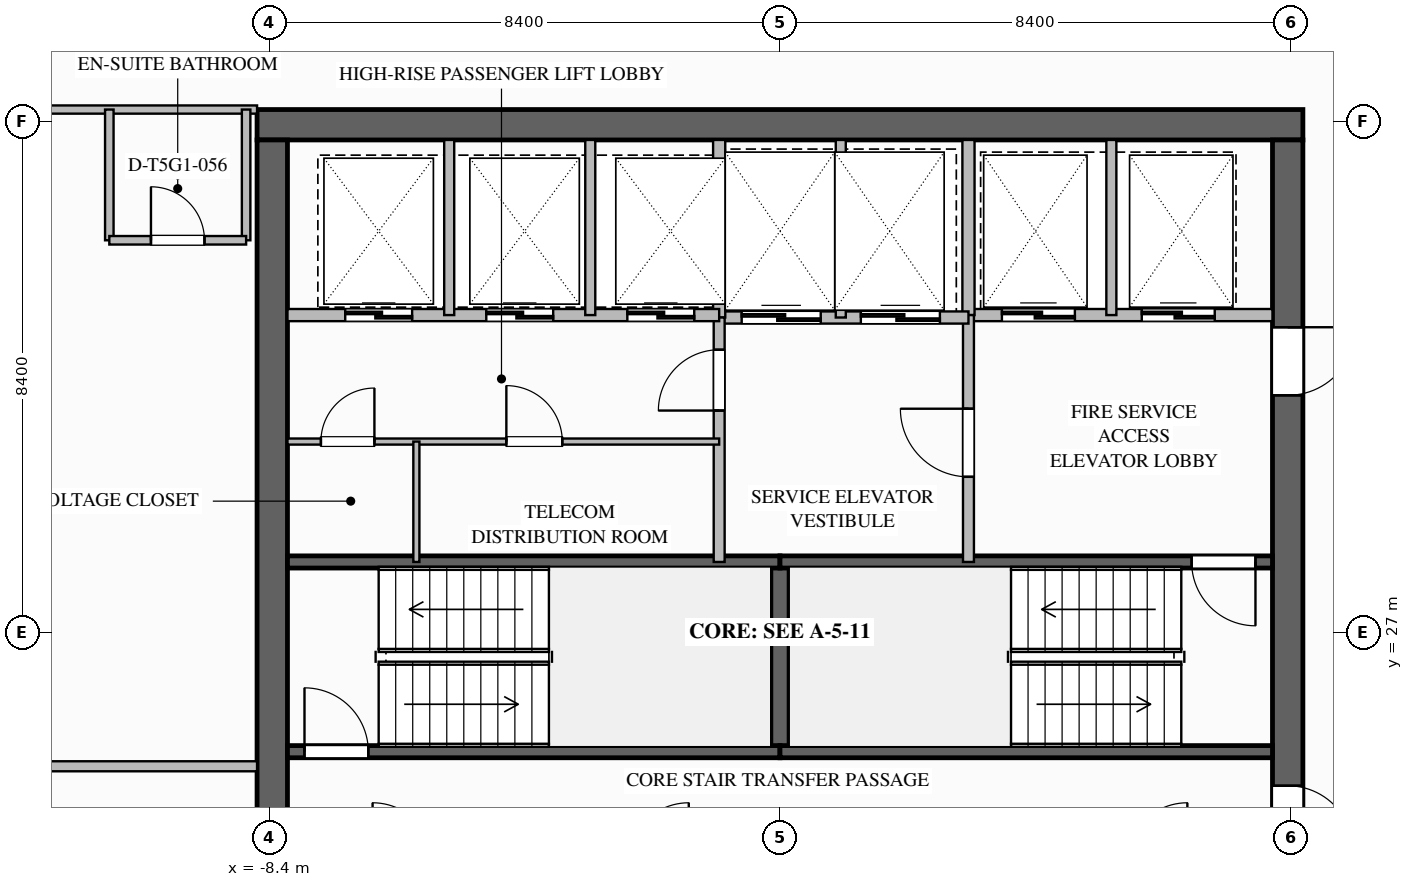
"""IFC4 building model, lengths in metres.
Left out: names, types, materials, properties, quantities, classifications, styles, units other than length and angle.
Written with IfcOpenShell. Run it as: python <this file> out.ifc"""

import sys

from ifc_helpers import new_model, si_unit, direction, frame, frame_2d, origin, place, context, subcontext, project, spatial, rectangle, extrude, element, fill, save


model = new_model("IFC4")
c1 = context("Model", 3, precision=1e-05, world=origin(), true_north=direction((0.0, 1.0)))
c2 = subcontext(c1, "Body", "Model", "MODEL_VIEW")
j1 = project(units=[si_unit("LENGTHUNIT", "METRE"), si_unit("PLANEANGLEUNIT", "RADIAN")], contexts=[c1])
p1 = place(None, origin())
s1 = spatial("IfcSite", under=j1, at=p1, CompositionType="ELEMENT")
p2 = place(p1, origin())
s2 = spatial("IfcBuilding", under=s1, at=p2, CompositionType="ELEMENT")
p3 = place(p2, frame((0.0, 0.0, 265.0)))
s3 = spatial("IfcBuildingStorey", under=s2, at=p3, CompositionType="ELEMENT", Elevation=265.0)
p4 = place(p3, frame((-8.6, 35.35, 0.0), z_axis=(0.0, 0.0, 1.0), x_axis=(1.0, 0.0, 0.0)))
e1 = element("IfcWall", 1, at=p4, inside=s3, PredefinedType="SHEAR", context=c2, shape_type="SweptSolid", body=[
    extrude(rectangle(XDim=17.2, YDim=0.5, at=frame_2d((8.6, 0.0))), origin(), (0.0, 0.0, 1.0), 3.65),
])
p5 = place(p3, frame((8.35, 35.1, 0.0), z_axis=(0.0, 0.0, 1.0), x_axis=(0.0, -1.0, 0.0)))
e2 = element("IfcWall", 2, at=p5, inside=s3, PredefinedType="SHEAR", context=c2, shape_type="SweptSolid", body=[
    extrude(rectangle(XDim=16.2, YDim=0.5, at=frame_2d((8.1, 0.0))), origin(), (0.0, 0.0, 1.0), 3.65),
])
p6 = place(p5, frame((3.08, 0.0, 0.0)))
e3 = element("IfcOpeningElement", 3, at=p6, cuts=e2, PredefinedType="OPENING", context=c2, shape_type="SweptSolid", body=[
    extrude(rectangle(XDim=1.12, YDim=2.1, at=frame_2d((0.56, 1.05))), frame((0.0, 0.26, 0.0), z_axis=(0.0, -1.0, 0.0), x_axis=(1.0, 0.0, 0.0)), (0.0, 0.0, 1.0), 0.52),
])
p7 = place(p5, frame((10.62, 0.0, 0.0)))
e4 = element("IfcOpeningElement", 4, at=p7, cuts=e2, PredefinedType="OPENING", context=c2, shape_type="SweptSolid", body=[
    extrude(rectangle(XDim=1.08, YDim=2.04, at=frame_2d((0.54, 1.02))), frame((0.0, 0.26, 0.0), z_axis=(0.0, -1.0, 0.0), x_axis=(1.0, 0.0, 0.0)), (0.0, 0.0, 1.0), 0.52),
])
p8 = place(p3, frame((-8.35, 18.9, 0.0), z_axis=(0.0, 0.0, 1.0), x_axis=(0.0, 1.0, 0.0)))
e5 = element("IfcWall", 5, at=p8, inside=s3, PredefinedType="SHEAR", context=c2, shape_type="SweptSolid", body=[
    extrude(rectangle(XDim=16.2, YDim=0.5, at=frame_2d((8.1, 0.0))), origin(), (0.0, 0.0, 1.0), 3.65),
])
p9 = place(p3, frame((0.0, 25.04, 0.0), z_axis=(0.0, 0.0, 1.0), x_axis=(0.0, 1.0, 0.0)))
e6 = element("IfcWall", 6, at=p9, inside=s3, PredefinedType="SOLIDWALL", context=c2, shape_type="SweptSolid", body=[
    extrude(rectangle(XDim=3.12, YDim=0.3, at=frame_2d((1.56, 0.0))), origin(), (0.0, 0.0, 1.0), 3.39),
])
p10 = place(p3, frame((-8.1, 25.04, 0.0), z_axis=(0.0, 0.0, 1.0), x_axis=(1.0, 0.0, 0.0)))
e7 = element("IfcWall", 7, at=p10, inside=s3, PredefinedType="SOLIDWALL", context=c2, shape_type="SweptSolid", body=[
    extrude(rectangle(XDim=8.1, YDim=0.2, at=frame_2d((4.05, 0.0))), origin(), (0.0, 0.0, 1.0), 3.39),
])
p11 = place(p10, frame((0.28, 0.0, 0.0)))
e8 = element("IfcOpeningElement", 8, at=p11, cuts=e7, PredefinedType="OPENING", context=c2, shape_type="SweptSolid", body=[
    extrude(rectangle(XDim=1.05, YDim=2.1, at=frame_2d((0.525, 1.05))), frame((0.0, 0.11, 0.0), z_axis=(0.0, -1.0, 0.0), x_axis=(1.0, 0.0, 0.0)), (0.0, 0.0, 1.0), 0.22),
])
for number, where, z_axis, x_axis in (
    (9, (-8.1, 28.16, 0.0), (0.0, 0.0, 1.0), (1.0, 0.0, 0.0)),
    (10, (0.0, 25.04, 0.0), (0.0, 0.0, 1.0), (1.0, 0.0, 0.0)),
):
    element("IfcWall", number, at=place(p3, frame(where, z_axis=z_axis, x_axis=x_axis)), inside=s3, PredefinedType="SOLIDWALL", context=c2, shape_type="SweptSolid", body=[
        extrude(rectangle(XDim=8.1, YDim=0.2, at=frame_2d((4.05, 0.0))), origin(), (0.0, 0.0, 1.0), 3.39),
    ])
p12 = place(p3, frame((8.1, 28.16, 0.0), z_axis=(0.0, 0.0, 1.0), x_axis=(-1.0, 0.0, 0.0)))
e11 = element("IfcWall", 11, at=p12, inside=s3, PredefinedType="SOLIDWALL", context=c2, shape_type="SweptSolid", body=[
    extrude(rectangle(XDim=8.1, YDim=0.2, at=frame_2d((4.05, 0.0))), origin(), (0.0, 0.0, 1.0), 3.39),
])
p13 = place(p12, frame((0.28, 0.0, 0.0)))
e12 = element("IfcOpeningElement", 12, at=p13, cuts=e11, PredefinedType="OPENING", context=c2, shape_type="SweptSolid", body=[
    extrude(rectangle(XDim=1.05, YDim=2.1, at=frame_2d((0.525, 1.05))), frame((0.0, 0.11, 0.0), z_axis=(0.0, -1.0, 0.0), x_axis=(1.0, 0.0, 0.0)), (0.0, 0.0, 1.0), 0.22),
])
p14 = place(p3, frame((3.1, 32.22, 0.0), z_axis=(0.0, 0.0, 1.0), x_axis=(1.0, 0.0, 0.0)))
e13 = element("IfcWall", 13, at=p14, inside=s3, PredefinedType="SOLIDWALL", context=c2, shape_type="SweptSolid", body=[
    extrude(rectangle(XDim=5.0, YDim=0.2, at=frame_2d((2.5, 0.0))), origin(), (0.0, 0.0, 1.0), 3.39),
])
p15 = place(p14, frame((0.55, 0.0, 0.0)))
e14 = element("IfcOpeningElement", 14, at=p15, cuts=e13, PredefinedType="OPENING", context=c2, shape_type="SweptSolid", body=[
    extrude(rectangle(XDim=1.2, YDim=2.2, at=frame_2d((0.6, 1.1))), frame((0.0, 0.11, 0.0), z_axis=(0.0, -1.0, 0.0), x_axis=(1.0, 0.0, 0.0)), (0.0, 0.0, 1.0), 0.22),
])
p16 = place(p14, frame((2.85, 0.0, 0.0)))
e15 = element("IfcOpeningElement", 15, at=p16, cuts=e13, PredefinedType="OPENING", context=c2, shape_type="SweptSolid", body=[
    extrude(rectangle(XDim=1.2, YDim=2.2, at=frame_2d((0.6, 1.1))), frame((0.0, 0.11, 0.0), z_axis=(0.0, -1.0, 0.0), x_axis=(1.0, 0.0, 0.0)), (0.0, 0.0, 1.0), 0.22),
])
p17 = place(p3, frame((3.1, 32.22, 0.0), z_axis=(0.0, 0.0, 1.0), x_axis=(0.0, 1.0, 0.0)))
e16 = element("IfcWall", 16, at=p17, inside=s3, PredefinedType="SOLIDWALL", context=c2, shape_type="SweptSolid", body=[
    extrude(rectangle(XDim=2.88, YDim=0.2, at=frame_2d((1.44, 0.0))), origin(), (0.0, 0.0, 1.0), 3.39),
])
p18 = place(p3, frame((5.45, 32.22, 0.0), z_axis=(0.0, 0.0, 1.0), x_axis=(0.0, 1.0, 0.0)))
e17 = element("IfcWall", 17, at=p18, inside=s3, PredefinedType="PARTITIONING", context=c2, shape_type="SweptSolid", body=[
    extrude(rectangle(XDim=2.88, YDim=0.165, at=frame_2d((1.44, 0.0))), origin(), (0.0, 0.0, 1.0), 3.39),
])
p19 = place(p3, frame((3.1, 28.16, 0.0), z_axis=(0.0, 0.0, 1.0), x_axis=(0.0, 1.0, 0.0)))
e18 = element("IfcWall", 18, at=p19, inside=s3, PredefinedType="SOLIDWALL", context=c2, shape_type="SweptSolid", body=[
    extrude(rectangle(XDim=4.06, YDim=0.18, at=frame_2d((2.03, 0.0))), origin(), (0.0, 0.0, 1.0), 3.39),
])
p20 = place(p19, frame((1.4, 0.0, 0.0)))
e19 = element("IfcOpeningElement", 19, at=p20, cuts=e18, PredefinedType="OPENING", context=c2, shape_type="SweptSolid", body=[
    extrude(rectangle(XDim=1.12, YDim=2.1, at=frame_2d((0.56, 1.05))), frame((0.0, 0.1, 0.0), z_axis=(0.0, -1.0, 0.0), x_axis=(1.0, 0.0, 0.0)), (0.0, 0.0, 1.0), 0.2),
])
p21 = place(p3, frame((-1.0, 32.18, 0.0), z_axis=(0.0, 0.0, 1.0), x_axis=(1.0, 0.0, 0.0)))
e20 = element("IfcWall", 20, at=p21, inside=s3, PredefinedType="SOLIDWALL", context=c2, shape_type="SweptSolid", body=[
    extrude(rectangle(XDim=4.1, YDim=0.2, at=frame_2d((2.05, 0.0))), origin(), (0.0, 0.0, 1.0), 3.39),
])
p22 = place(p21, frame((0.37, 0.0, 0.0)))
e21 = element("IfcOpeningElement", 21, at=p22, cuts=e20, PredefinedType="OPENING", context=c2, shape_type="SweptSolid", body=[
    extrude(rectangle(XDim=1.3, YDim=2.2, at=frame_2d((0.65, 1.1))), frame((0.0, 0.11, 0.0), z_axis=(0.0, -1.0, 0.0), x_axis=(1.0, 0.0, 0.0)), (0.0, 0.0, 1.0), 0.22),
])
p23 = place(p21, frame((2.33, 0.0, 0.0)))
e22 = element("IfcOpeningElement", 22, at=p23, cuts=e20, PredefinedType="OPENING", context=c2, shape_type="SweptSolid", body=[
    extrude(rectangle(XDim=1.3, YDim=2.2, at=frame_2d((0.65, 1.1))), frame((0.0, 0.11, 0.0), z_axis=(0.0, -1.0, 0.0), x_axis=(1.0, 0.0, 0.0)), (0.0, 0.0, 1.0), 0.22),
])
p24 = place(p3, frame((-1.0, 32.18, 0.0), z_axis=(0.0, 0.0, 1.0), x_axis=(0.0, 1.0, 0.0)))
e23 = element("IfcWall", 23, at=p24, inside=s3, PredefinedType="SOLIDWALL", context=c2, shape_type="SweptSolid", body=[
    extrude(rectangle(XDim=2.92, YDim=0.2, at=frame_2d((1.46, 0.0))), origin(), (0.0, 0.0, 1.0), 3.39),
])
p25 = place(p3, frame((1.0, 32.18, 0.0), z_axis=(0.0, 0.0, 1.0), x_axis=(0.0, 1.0, 0.0)))
e24 = element("IfcWall", 24, at=p25, inside=s3, PredefinedType="PARTITIONING", context=c2, shape_type="SweptSolid", body=[
    extrude(rectangle(XDim=2.92, YDim=0.165, at=frame_2d((1.46, 0.0))), origin(), (0.0, 0.0, 1.0), 3.39),
])
p26 = place(p3, frame((-1.0, 28.16, 0.0), z_axis=(0.0, 0.0, 1.0), x_axis=(0.0, 1.0, 0.0)))
e25 = element("IfcWall", 25, at=p26, inside=s3, PredefinedType="SOLIDWALL", context=c2, shape_type="SweptSolid", body=[
    extrude(rectangle(XDim=4.02, YDim=0.18, at=frame_2d((2.01, 0.0))), origin(), (0.0, 0.0, 1.0), 3.39),
])
p27 = place(p26, frame((2.49, 0.0, 0.0)))
e26 = element("IfcOpeningElement", 26, at=p27, cuts=e25, PredefinedType="OPENING", context=c2, shape_type="SweptSolid", body=[
    extrude(rectangle(XDim=1.0, YDim=2.1, at=frame_2d((0.5, 1.05))), frame((0.0, 0.1, 0.0), z_axis=(0.0, -1.0, 0.0), x_axis=(1.0, 0.0, 0.0)), (0.0, 0.0, 1.0), 0.2),
])
p28 = place(p3, frame((-8.1, 32.22, 0.0), z_axis=(0.0, 0.0, 1.0), x_axis=(1.0, 0.0, 0.0)))
e27 = element("IfcWall", 27, at=p28, inside=s3, PredefinedType="SOLIDWALL", context=c2, shape_type="SweptSolid", body=[
    extrude(rectangle(XDim=7.1, YDim=0.2, at=frame_2d((3.55, 0.0))), origin(), (0.0, 0.0, 1.0), 3.39),
])
p29 = place(p28, frame((0.95, 0.0, 0.0)))
e28 = element("IfcOpeningElement", 28, at=p29, cuts=e27, PredefinedType="OPENING", context=c2, shape_type="SweptSolid", body=[
    extrude(rectangle(XDim=1.1, YDim=2.2, at=frame_2d((0.55, 1.1))), frame((0.0, 0.11, 0.0), z_axis=(0.0, -1.0, 0.0), x_axis=(1.0, 0.0, 0.0)), (0.0, 0.0, 1.0), 0.22),
])
p30 = place(p28, frame((3.27, 0.0, 0.0)))
e29 = element("IfcOpeningElement", 29, at=p30, cuts=e27, PredefinedType="OPENING", context=c2, shape_type="SweptSolid", body=[
    extrude(rectangle(XDim=1.1, YDim=2.2, at=frame_2d((0.55, 1.1))), frame((0.0, 0.11, 0.0), z_axis=(0.0, -1.0, 0.0), x_axis=(1.0, 0.0, 0.0)), (0.0, 0.0, 1.0), 0.22),
])
p31 = place(p28, frame((5.59, 0.0, 0.0)))
e30 = element("IfcOpeningElement", 30, at=p31, cuts=e27, PredefinedType="OPENING", context=c2, shape_type="SweptSolid", body=[
    extrude(rectangle(XDim=1.1, YDim=2.2, at=frame_2d((0.55, 1.1))), frame((0.0, 0.11, 0.0), z_axis=(0.0, -1.0, 0.0), x_axis=(1.0, 0.0, 0.0)), (0.0, 0.0, 1.0), 0.22),
])
for number, where, z_axis, x_axis in (
    (31, (-5.44, 32.22, 0.0), (0.0, 0.0, 1.0), (0.0, 1.0, 0.0)),
    (32, (-3.12, 32.22, 0.0), (0.0, 0.0, 1.0), (0.0, 1.0, 0.0)),
):
    element("IfcWall", number, at=place(p3, frame(where, z_axis=z_axis, x_axis=x_axis)), inside=s3, PredefinedType="PARTITIONING", context=c2, shape_type="SweptSolid", body=[
        extrude(rectangle(XDim=2.88, YDim=0.165, at=frame_2d((1.44, 0.0))), origin(), (0.0, 0.0, 1.0), 3.39),
    ])
p32 = place(p3, frame((-8.1, 30.14, 0.0), z_axis=(0.0, 0.0, 1.0), x_axis=(1.0, 0.0, 0.0)))
e33 = element("IfcWall", 33, at=p32, inside=s3, PredefinedType="PARTITIONING", context=c2, shape_type="SweptSolid", body=[
    extrude(rectangle(XDim=7.1, YDim=0.1, at=frame_2d((3.55, 0.0))), origin(), (0.0, 0.0, 1.0), 3.39),
])
p33 = place(p32, frame((0.55, 0.0, 0.0)))
e34 = element("IfcOpeningElement", 34, at=p33, cuts=e33, PredefinedType="OPENING", context=c2, shape_type="SweptSolid", body=[
    extrude(rectangle(XDim=0.88, YDim=2.1, at=frame_2d((0.44, 1.05))), frame((0.0, 0.06, 0.0), z_axis=(0.0, -1.0, 0.0), x_axis=(1.0, 0.0, 0.0)), (0.0, 0.0, 1.0), 0.12),
])
p34 = place(p32, frame((3.6, 0.0, 0.0)))
e35 = element("IfcOpeningElement", 35, at=p34, cuts=e33, PredefinedType="OPENING", context=c2, shape_type="SweptSolid", body=[
    extrude(rectangle(XDim=0.92, YDim=2.1, at=frame_2d((0.46, 1.05))), frame((0.0, 0.06, 0.0), z_axis=(0.0, -1.0, 0.0), x_axis=(1.0, 0.0, 0.0)), (0.0, 0.0, 1.0), 0.12),
])
p35 = place(p3, frame((-5.98, 28.16, 0.0), z_axis=(0.0, 0.0, 1.0), x_axis=(0.0, 1.0, 0.0)))
e36 = element("IfcWall", 36, at=p35, inside=s3, PredefinedType="PARTITIONING", context=c2, shape_type="SweptSolid", body=[
    extrude(rectangle(XDim=1.98, YDim=0.1, at=frame_2d((0.99, 0.0))), origin(), (0.0, 0.0, 1.0), 3.39),
])
p36 = place(p3, frame((-16.2, 35.6, 0.0), z_axis=(0.0, 0.0, 1.0), x_axis=(1.0, 0.0, 0.0)))
e37 = element("IfcWall", 37, at=p36, inside=s3, PredefinedType="PARTITIONING", context=c2, shape_type="SweptSolid", body=[
    extrude(rectangle(XDim=7.6, YDim=0.135, at=frame_2d((3.8, 0.0))), origin(), (0.0, 0.0, 1.0), 2.767),
])
p37 = place(p36, frame((2.155, 0.0, 0.0)))
e38 = element("IfcOpeningElement", 38, at=p37, cuts=e37, PredefinedType="OPENING", context=c2, shape_type="SweptSolid", body=[
    extrude(rectangle(XDim=1.26, YDim=2.2, at=frame_2d((0.63, 1.1))), frame((0.0, 0.077, 0.0), z_axis=(0.0, -1.0, 0.0), x_axis=(1.0, 0.0, 0.0)), (0.0, 0.0, 1.0), 0.155),
])
p38 = place(p3, frame((-21.4, 24.8, 0.0), z_axis=(0.0, 0.0, 1.0), x_axis=(1.0, 0.0, 0.0)))
e39 = element("IfcWall", 39, at=p38, inside=s3, PredefinedType="PARTITIONING", context=c2, shape_type="SweptSolid", body=[
    extrude(rectangle(XDim=12.8, YDim=0.165, at=frame_2d((6.4, 0.0))), origin(), (0.0, 0.0, 1.0), 3.39),
])
for number, where, z_axis, x_axis in (
    (40, (-11.03, 35.6, 0.0), (0.0, 0.0, 1.0), (0.0, -1.0, 0.0)),
    (41, (-8.78, 35.6, 0.0), (0.0, 0.0, 1.0), (0.0, -1.0, 0.0)),
):
    element("IfcWall", number, at=place(p3, frame(where, z_axis=z_axis, x_axis=x_axis)), inside=s3, PredefinedType="PLUMBINGWALL", context=c2, shape_type="SweptSolid", body=[
        extrude(rectangle(XDim=2.15, YDim=0.14, at=frame_2d((1.075, 0.0))), origin(), (0.0, 0.0, 1.0), 3.39),
    ])
p39 = place(p3, frame((-11.03, 33.45, 0.0), z_axis=(0.0, 0.0, 1.0), x_axis=(1.0, 0.0, 0.0)))
e42 = element("IfcWall", 42, at=p39, inside=s3, PredefinedType="PLUMBINGWALL", context=c2, shape_type="SweptSolid", body=[
    extrude(rectangle(XDim=2.25, YDim=0.14, at=frame_2d((1.125, 0.0))), origin(), (0.0, 0.0, 1.0), 3.39),
])
p40 = place(p39, frame((0.685, 0.0, 0.0)))
e43 = element("IfcOpeningElement", 43, at=p40, cuts=e42, PredefinedType="OPENING", context=c2, shape_type="SweptSolid", body=[
    extrude(rectangle(XDim=0.88, YDim=2.1, at=frame_2d((0.44, 1.05))), frame((0.0, 0.08, 0.0), z_axis=(0.0, -1.0, 0.0), x_axis=(1.0, 0.0, 0.0)), (0.0, 0.0, 1.0), 0.16),
])
p41 = place(p11, origin())
e44 = element("IfcDoor", 44, at=p41, inside=s3, OperationType="SINGLE_SWING_LEFT", PredefinedType="DOOR", context=c2, shape_type="SweptSolid", body=[
    extrude(rectangle(XDim=1.05, YDim=2.1, at=frame_2d((0.525, 1.05))), frame((0.0, 0.025, 0.0), z_axis=(0.0, -1.0, 0.0), x_axis=(1.0, 0.0, 0.0)), (0.0, 0.0, 1.0), 0.05),
])
fill(e8, e44)
p42 = place(p13, origin())
e45 = element("IfcDoor", 45, at=p42, inside=s3, OperationType="SINGLE_SWING_LEFT", PredefinedType="DOOR", context=c2, shape_type="SweptSolid", body=[
    extrude(rectangle(XDim=1.05, YDim=2.1, at=frame_2d((0.525, 1.05))), frame((0.0, 0.025, 0.0), z_axis=(0.0, -1.0, 0.0), x_axis=(1.0, 0.0, 0.0)), (0.0, 0.0, 1.0), 0.05),
])
fill(e12, e45)
p43 = place(p15, origin())
e46 = element("IfcDoor", 46, at=p43, inside=s3, OperationType="SLIDING_TO_LEFT", PredefinedType="DOOR", context=c2, shape_type="SweptSolid", body=[
    extrude(rectangle(XDim=1.2, YDim=2.2, at=frame_2d((0.6, 1.1))), frame((0.0, 0.025, 0.0), z_axis=(0.0, -1.0, 0.0), x_axis=(1.0, 0.0, 0.0)), (0.0, 0.0, 1.0), 0.05),
])
fill(e14, e46)
p44 = place(p16, origin())
e47 = element("IfcDoor", 47, at=p44, inside=s3, OperationType="SLIDING_TO_LEFT", PredefinedType="DOOR", context=c2, shape_type="SweptSolid", body=[
    extrude(rectangle(XDim=1.2, YDim=2.2, at=frame_2d((0.6, 1.1))), frame((0.0, 0.025, 0.0), z_axis=(0.0, -1.0, 0.0), x_axis=(1.0, 0.0, 0.0)), (0.0, 0.0, 1.0), 0.05),
])
fill(e15, e47)
p45 = place(p20, origin())
e48 = element("IfcDoor", 48, at=p45, inside=s3, OperationType="SINGLE_SWING_RIGHT", PredefinedType="DOOR", context=c2, shape_type="SweptSolid", body=[
    extrude(rectangle(XDim=1.12, YDim=2.1, at=frame_2d((0.56, 1.05))), frame((0.0, 0.025, 0.0), z_axis=(0.0, -1.0, 0.0), x_axis=(1.0, 0.0, 0.0)), (0.0, 0.0, 1.0), 0.05),
])
fill(e19, e48)
p46 = place(p6, origin())
e49 = element("IfcDoor", 49, at=p46, inside=s3, OperationType="SINGLE_SWING_LEFT", PredefinedType="DOOR", context=c2, shape_type="SweptSolid", body=[
    extrude(rectangle(XDim=1.12, YDim=2.1, at=frame_2d((0.56, 1.05))), frame((0.0, 0.025, 0.0), z_axis=(0.0, -1.0, 0.0), x_axis=(1.0, 0.0, 0.0)), (0.0, 0.0, 1.0), 0.05),
])
fill(e3, e49)
p47 = place(p22, origin())
e50 = element("IfcDoor", 50, at=p47, inside=s3, OperationType="SLIDING_TO_LEFT", PredefinedType="DOOR", context=c2, shape_type="SweptSolid", body=[
    extrude(rectangle(XDim=1.3, YDim=2.2, at=frame_2d((0.65, 1.1))), frame((0.0, 0.025, 0.0), z_axis=(0.0, -1.0, 0.0), x_axis=(1.0, 0.0, 0.0)), (0.0, 0.0, 1.0), 0.05),
])
fill(e21, e50)
p48 = place(p23, origin())
e51 = element("IfcDoor", 51, at=p48, inside=s3, OperationType="SLIDING_TO_LEFT", PredefinedType="DOOR", context=c2, shape_type="SweptSolid", body=[
    extrude(rectangle(XDim=1.3, YDim=2.2, at=frame_2d((0.65, 1.1))), frame((0.0, 0.025, 0.0), z_axis=(0.0, -1.0, 0.0), x_axis=(1.0, 0.0, 0.0)), (0.0, 0.0, 1.0), 0.05),
])
fill(e22, e51)
p49 = place(p27, origin())
e52 = element("IfcDoor", 52, at=p49, inside=s3, OperationType="SINGLE_SWING_LEFT", PredefinedType="DOOR", context=c2, shape_type="SweptSolid", body=[
    extrude(rectangle(XDim=1.0, YDim=2.1, at=frame_2d((0.5, 1.05))), frame((0.0, 0.025, 0.0), z_axis=(0.0, -1.0, 0.0), x_axis=(1.0, 0.0, 0.0)), (0.0, 0.0, 1.0), 0.05),
])
fill(e26, e52)
p50 = place(p29, origin())
e53 = element("IfcDoor", 53, at=p50, inside=s3, OperationType="SLIDING_TO_LEFT", PredefinedType="DOOR", context=c2, shape_type="SweptSolid", body=[
    extrude(rectangle(XDim=1.1, YDim=2.2, at=frame_2d((0.55, 1.1))), frame((0.0, 0.025, 0.0), z_axis=(0.0, -1.0, 0.0), x_axis=(1.0, 0.0, 0.0)), (0.0, 0.0, 1.0), 0.05),
])
fill(e28, e53)
p51 = place(p30, origin())
e54 = element("IfcDoor", 54, at=p51, inside=s3, OperationType="SLIDING_TO_LEFT", PredefinedType="DOOR", context=c2, shape_type="SweptSolid", body=[
    extrude(rectangle(XDim=1.1, YDim=2.2, at=frame_2d((0.55, 1.1))), frame((0.0, 0.025, 0.0), z_axis=(0.0, -1.0, 0.0), x_axis=(1.0, 0.0, 0.0)), (0.0, 0.0, 1.0), 0.05),
])
fill(e29, e54)
p52 = place(p31, origin())
e55 = element("IfcDoor", 55, at=p52, inside=s3, OperationType="SLIDING_TO_LEFT", PredefinedType="DOOR", context=c2, shape_type="SweptSolid", body=[
    extrude(rectangle(XDim=1.1, YDim=2.2, at=frame_2d((0.55, 1.1))), frame((0.0, 0.025, 0.0), z_axis=(0.0, -1.0, 0.0), x_axis=(1.0, 0.0, 0.0)), (0.0, 0.0, 1.0), 0.05),
])
fill(e30, e55)
p53 = place(p33, origin())
e56 = element("IfcDoor", 56, at=p53, inside=s3, OperationType="SINGLE_SWING_RIGHT", PredefinedType="DOOR", context=c2, shape_type="SweptSolid", body=[
    extrude(rectangle(XDim=0.88, YDim=2.1, at=frame_2d((0.44, 1.05))), frame((0.0, 0.025, 0.0), z_axis=(0.0, -1.0, 0.0), x_axis=(1.0, 0.0, 0.0)), (0.0, 0.0, 1.0), 0.05),
])
fill(e34, e56)
p54 = place(p34, origin())
e57 = element("IfcDoor", 57, at=p54, inside=s3, OperationType="SINGLE_SWING_LEFT", PredefinedType="DOOR", context=c2, shape_type="SweptSolid", body=[
    extrude(rectangle(XDim=0.92, YDim=2.1, at=frame_2d((0.46, 1.05))), frame((0.0, 0.025, 0.0), z_axis=(0.0, -1.0, 0.0), x_axis=(1.0, 0.0, 0.0)), (0.0, 0.0, 1.0), 0.05),
])
fill(e35, e57)
p55 = place(p7, origin())
e58 = element("IfcDoor", 58, at=p55, inside=s3, OperationType="SINGLE_SWING_RIGHT", PredefinedType="DOOR", context=c2, shape_type="SweptSolid", body=[
    extrude(rectangle(XDim=1.08, YDim=2.04, at=frame_2d((0.54, 1.02))), frame((0.0, 0.025, 0.0), z_axis=(0.0, -1.0, 0.0), x_axis=(1.0, 0.0, 0.0)), (0.0, 0.0, 1.0), 0.05),
])
fill(e4, e58)
p56 = place(p40, origin())
e59 = element("IfcDoor", 59, at=p56, inside=s3, OperationType="SINGLE_SWING_LEFT", PredefinedType="DOOR", context=c2, shape_type="SweptSolid", body=[
    extrude(rectangle(XDim=0.88, YDim=2.1, at=frame_2d((0.44, 1.05))), frame((0.0, 0.025, 0.0), z_axis=(0.0, -1.0, 0.0), x_axis=(1.0, 0.0, 0.0)), (0.0, 0.0, 1.0), 0.05),
])
fill(e43, e59)
save(model, sys.argv[1])
